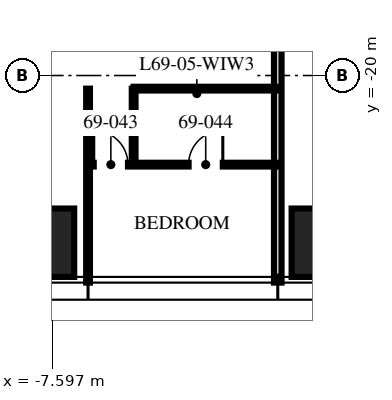
"""IFC4 building model, lengths in metres.
Left out: names, types, materials, properties, quantities, classifications, styles, units other than length and angle.
Written with IfcOpenShell. Run it as: python <this file> out.ifc"""

import sys

from ifc_helpers import new_model, si_unit, direction, frame, frame_2d, origin, origin_2d, place, context, subcontext, project, spatial, rectangle, hollow_rectangle, extrude, element, fill, save


model = new_model("IFC4")
c1 = context("Model", 3, precision=1e-05, world=origin(), true_north=direction((0.0, 1.0)))
c2 = subcontext(c1, "Body", "Model", "MODEL_VIEW")
j1 = project(units=[si_unit("LENGTHUNIT", "METRE"), si_unit("PLANEANGLEUNIT", "RADIAN")], contexts=[c1])
p1 = place(None, origin())
s1 = spatial("IfcSite", under=j1, at=p1, CompositionType="ELEMENT")
p2 = place(p1, origin())
s2 = spatial("IfcBuilding", under=s1, at=p2, CompositionType="ELEMENT")
p3 = place(p2, frame((0.0, 0.0, 274.5)))
s3 = spatial("IfcBuildingStorey", under=s2, at=p3, CompositionType="ELEMENT", Elevation=274.5)
p4 = place(p3, frame((0.0, -24.4, 0.0), z_axis=(0.0, 0.0, 1.0), x_axis=(1.0, 0.0, 0.0)))
e1 = element("IfcColumn", 1, at=p4, inside=s3, PredefinedType="COLUMN", context=c2, shape_type="SweptSolid", body=[
    extrude(hollow_rectangle(XDim=2.6, YDim=1.8, WallThickness=0.14, at=origin_2d()), origin(), (0.0, 0.0, 1.0), 2.78),
])
p5 = place(p3, frame((-8.32, -24.4, 0.0), z_axis=(0.0, 0.0, 1.0), x_axis=(1.0, 0.0, 0.0)))
e2 = element("IfcColumn", 2, at=p5, inside=s3, PredefinedType="COLUMN", context=c2, shape_type="SweptSolid", body=[
    extrude(hollow_rectangle(XDim=2.6, YDim=1.8, WallThickness=0.14, at=origin_2d()), origin(), (0.0, 0.0, 1.0), 2.64),
])
p6 = place(p3, frame((-6.656, -20.345, 0.0), z_axis=(0.0, 0.0, 1.0), x_axis=(0.0, -1.0, 0.0)))
e3 = element("IfcWall", 3, at=p6, inside=s3, PredefinedType="PARTITIONING", context=c2, shape_type="SweptSolid", body=[
    extrude(rectangle(XDim=5.105, YDim=0.1, at=frame_2d((2.552, 0.0))), origin(), (0.0, 0.0, 1.0), 2.75),
])
p7 = place(p3, frame((-1.664, -12.8, 0.0), z_axis=(0.0, 0.0, 1.0), x_axis=(0.0, -1.0, 0.0)))
e4 = element("IfcWall", 4, at=p7, inside=s3, PredefinedType="PARTITIONING", context=c2, shape_type="SweptSolid", body=[
    extrude(rectangle(XDim=12.65, YDim=0.2, at=frame_2d((6.325, 0.0))), origin(), (0.0, 0.0, 1.0), 2.75),
])
p8 = place(p3, frame((-6.656, -22.345, 0.0), z_axis=(0.0, 0.0, 1.0), x_axis=(1.0, 0.0, 0.0)))
e5 = element("IfcWall", 5, at=p8, inside=s3, PredefinedType="PARTITIONING", context=c2, shape_type="SweptSolid", body=[
    extrude(rectangle(XDim=4.992, YDim=0.1, at=frame_2d((2.496, 0.0))), origin(), (0.0, 0.0, 1.0), 2.2),
])
p9 = place(p8, frame((0.15, 0.0, 0.0)))
e6 = element("IfcOpeningElement", 6, at=p9, cuts=e5, PredefinedType="OPENING", context=c2, shape_type="SweptSolid", body=[
    extrude(rectangle(XDim=0.9, YDim=2.1, at=frame_2d((0.45, 1.05))), frame((0.0, 0.06, 0.0), z_axis=(0.0, -1.0, 0.0), x_axis=(1.0, 0.0, 0.0)), (0.0, 0.0, 1.0), 0.12),
])
p10 = place(p8, frame((2.646, 0.0, 0.0)))
e7 = element("IfcOpeningElement", 7, at=p10, cuts=e5, PredefinedType="OPENING", context=c2, shape_type="SweptSolid", body=[
    extrude(rectangle(XDim=0.9, YDim=2.1, at=frame_2d((0.45, 1.05))), frame((0.0, 0.06, 0.0), z_axis=(0.0, -1.0, 0.0), x_axis=(1.0, 0.0, 0.0)), (0.0, 0.0, 1.0), 0.12),
])
p11 = place(p3, frame((-5.456, -20.345, 0.0), z_axis=(0.0, 0.0, 1.0), x_axis=(0.0, -1.0, 0.0)))
e8 = element("IfcWall", 8, at=p11, inside=s3, PredefinedType="PARTITIONING", context=c2, shape_type="SweptSolid", body=[
    extrude(rectangle(XDim=2.0, YDim=0.1, at=frame_2d((1.0, 0.0))), origin(), (0.0, 0.0, 1.0), 2.75),
])
p12 = place(p3, frame((-5.456, -20.345, 0.0), z_axis=(0.0, 0.0, 1.0), x_axis=(1.0, 0.0, 0.0)))
e9 = element("IfcWall", 9, at=p12, inside=s3, PredefinedType="PARTITIONING", context=c2, shape_type="SweptSolid", body=[
    extrude(rectangle(XDim=3.792, YDim=0.1, at=frame_2d((1.896, 0.0))), origin(), (0.0, 0.0, 1.0), 2.2),
])
p13 = place(p9, origin())
e10 = element("IfcDoor", 10, at=p13, inside=s3, OperationType="SINGLE_SWING_LEFT", PredefinedType="DOOR", context=c2, shape_type="SweptSolid", body=[
    extrude(rectangle(XDim=0.9, YDim=2.1, at=frame_2d((0.45, 1.05))), frame((0.0, 0.025, 0.0), z_axis=(0.0, -1.0, 0.0), x_axis=(1.0, 0.0, 0.0)), (0.0, 0.0, 1.0), 0.05),
])
fill(e6, e10)
p14 = place(p10, origin())
e11 = element("IfcDoor", 11, at=p14, inside=s3, OperationType="SINGLE_SWING_RIGHT", PredefinedType="DOOR", context=c2, shape_type="SweptSolid", body=[
    extrude(rectangle(XDim=0.9, YDim=2.1, at=frame_2d((0.45, 1.05))), frame((0.0, 0.025, 0.0), z_axis=(0.0, -1.0, 0.0), x_axis=(1.0, 0.0, 0.0)), (0.0, 0.0, 1.0), 0.05),
])
fill(e7, e11)
save(model, sys.argv[1])
